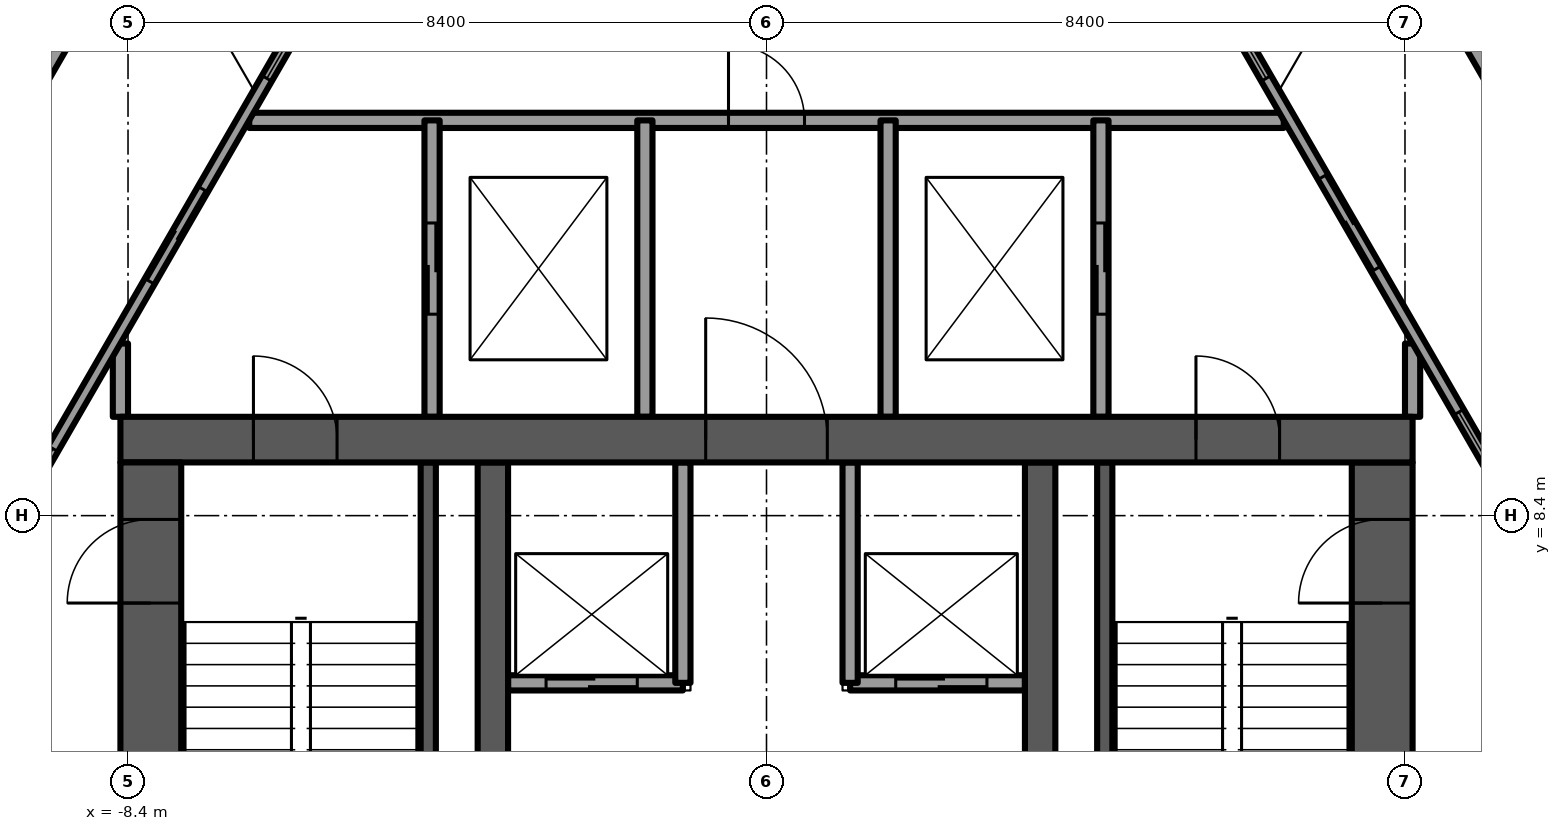
"""IFC4 building model, lengths in metres.
Left out: names, types, materials, properties, quantities, classifications, styles, units other than length and angle.
Written with IfcOpenShell. Run it as: python <this file> out.ifc"""

import sys

from ifc_helpers import new_model, si_unit, direction, frame, frame_2d, origin, place, context, subcontext, project, spatial, rectangle, extrude, element, fill, save


model = new_model("IFC4")
c1 = context("Model", 3, precision=1e-05, world=origin(), true_north=direction((0.0, 1.0)))
c2 = subcontext(c1, "Body", "Model", "MODEL_VIEW")
j1 = project(units=[si_unit("LENGTHUNIT", "METRE"), si_unit("PLANEANGLEUNIT", "RADIAN")], contexts=[c1])
p1 = place(None, origin())
s1 = spatial("IfcSite", under=j1, at=p1, CompositionType="ELEMENT")
p2 = place(p1, origin())
s2 = spatial("IfcBuilding", under=s1, at=p2, CompositionType="ELEMENT")
p3 = place(p2, frame((0.0, 0.0, 267.5)))
s3 = spatial("IfcBuildingStorey", under=s2, at=p3, CompositionType="ELEMENT", Elevation=267.5)
p4 = place(p3, frame((-8.5, 9.4, -0.3), z_axis=(0.0, 0.0, 1.0), x_axis=(1.0, 0.0, 0.0)))
e1 = element("IfcWall", 1, at=p4, inside=s3, PredefinedType="SHEAR", context=c2, shape_type="SweptSolid", body=[
    extrude(rectangle(XDim=17.0, YDim=0.6, at=frame_2d((8.5, 0.0))), origin(), (0.0, 0.0, 1.0), 3.75),
])
p5 = place(p4, frame((7.7, 0.0, 0.0)))
e2 = element("IfcOpeningElement", 2, at=p5, cuts=e1, PredefinedType="OPENING", context=c2, shape_type="SweptSolid", body=[
    extrude(rectangle(XDim=1.6, YDim=2.1, at=frame_2d((0.8, 1.05))), frame((0.0, 0.3, 0.0), z_axis=(0.0, -1.0, 0.0), x_axis=(1.0, 0.0, 0.0)), (0.0, 0.0, 1.0), 0.6),
])
p6 = place(p4, frame((1.75, 0.0, 0.0)))
e3 = element("IfcOpeningElement", 3, at=p6, cuts=e1, PredefinedType="OPENING", context=c2, shape_type="SweptSolid", body=[
    extrude(rectangle(XDim=1.1, YDim=2.1, at=frame_2d((0.55, 1.05))), frame((0.0, 0.3, 0.0), z_axis=(0.0, -1.0, 0.0), x_axis=(1.0, 0.0, 0.0)), (0.0, 0.0, 1.0), 0.6),
])
p7 = place(p4, frame((14.15, 0.0, 0.0)))
e4 = element("IfcOpeningElement", 4, at=p7, cuts=e1, PredefinedType="OPENING", context=c2, shape_type="SweptSolid", body=[
    extrude(rectangle(XDim=1.1, YDim=2.1, at=frame_2d((0.55, 1.05))), frame((0.0, 0.3, 0.0), z_axis=(0.0, -1.0, 0.0), x_axis=(1.0, 0.0, 0.0)), (0.0, 0.0, 1.0), 0.6),
])
p8 = place(p3, frame((-8.1, -1.1, -0.3), z_axis=(0.0, 0.0, 1.0), x_axis=(0.0, 1.0, 0.0)))
e5 = element("IfcWall", 5, at=p8, inside=s3, PredefinedType="SHEAR", context=c2, shape_type="SweptSolid", body=[
    extrude(rectangle(XDim=10.2, YDim=0.8, at=frame_2d((5.1, 0.0))), origin(), (0.0, 0.0, 1.0), 3.75),
])
p9 = place(p8, frame((8.35, 0.0, 0.0)))
e6 = element("IfcOpeningElement", 6, at=p9, cuts=e5, PredefinedType="OPENING", context=c2, shape_type="SweptSolid", body=[
    extrude(rectangle(XDim=1.1, YDim=2.1, at=frame_2d((0.55, 1.05))), frame((0.0, 0.4, 0.0), z_axis=(0.0, -1.0, 0.0), x_axis=(1.0, 0.0, 0.0)), (0.0, 0.0, 1.0), 0.8),
])
p10 = place(p3, frame((8.1, -1.1, -0.3), z_axis=(0.0, 0.0, 1.0), x_axis=(0.0, 1.0, 0.0)))
e7 = element("IfcWall", 7, at=p10, inside=s3, PredefinedType="SHEAR", context=c2, shape_type="SweptSolid", body=[
    extrude(rectangle(XDim=10.2, YDim=0.8, at=frame_2d((5.1, 0.0))), origin(), (0.0, 0.0, 1.0), 3.75),
])
p11 = place(p10, frame((8.35, 0.0, 0.0)))
e8 = element("IfcOpeningElement", 8, at=p11, cuts=e7, PredefinedType="OPENING", context=c2, shape_type="SweptSolid", body=[
    extrude(rectangle(XDim=1.1, YDim=2.1, at=frame_2d((0.55, 1.05))), frame((0.0, 0.4, 0.0), z_axis=(0.0, -1.0, 0.0), x_axis=(1.0, 0.0, 0.0)), (0.0, 0.0, 1.0), 0.8),
])
for number, where, z_axis, x_axis in (
    (9, (-3.6, -1.1, -0.3), (0.0, 0.0, 1.0), (0.0, 1.0, 0.0)),
    (10, (3.6, -1.1, -0.3), (0.0, 0.0, 1.0), (0.0, 1.0, 0.0)),
):
    element("IfcWall", number, at=place(p3, frame(where, z_axis=z_axis, x_axis=x_axis)), inside=s3, PredefinedType="SHEAR", context=c2, shape_type="SweptSolid", body=[
        extrude(rectangle(XDim=10.2, YDim=0.4, at=frame_2d((5.1, 0.0))), origin(), (0.0, 0.0, 1.0), 3.75),
    ])
for number, where, z_axis, x_axis in (
    (11, (-8.637, 16.428, 0.0), (0.0, 0.0, 1.0), (-0.5, -0.866, 0.0)),
    (12, (11.716, 11.094, 0.0), (0.0, 0.0, 1.0), (-0.5, 0.866, 0.0)),
):
    element("IfcWall", number, at=place(p3, frame(where, z_axis=z_axis, x_axis=x_axis)), inside=s3, PredefinedType="PARAPET", context=c2, shape_type="SweptSolid", body=[
        extrude(rectangle(XDim=6.159, YDim=0.9, at=frame_2d((3.08, 0.0))), origin(), (0.0, 0.0, 1.0), 1.1),
    ])
p12 = place(p3, frame((-5.626, 15.792, 0.0), z_axis=(0.0, 0.0, 1.0), x_axis=(-0.499998195608, -0.866026445548, 0.0)))
e13 = element("IfcWall", 13, at=p12, inside=s3, PredefinedType="SOLIDWALL", context=c2, shape_type="SweptSolid", body=[
    extrude(rectangle(XDim=18.956, YDim=0.15, at=frame_2d((9.478, 0.0))), origin(), (0.0, 0.0, 1.0), 3.45),
])
p13 = place(p12, frame((3.577, 0.0, 0.0)))
e14 = element("IfcOpeningElement", 14, at=p13, cuts=e13, PredefinedType="OPENING", context=c2, shape_type="SweptSolid", body=[
    extrude(rectangle(XDim=1.4, YDim=2.4, at=frame_2d((0.7, 1.2))), frame((0.0, 0.075, 0.0), z_axis=(0.0, -1.0, 0.0), x_axis=(1.0, 0.0, 0.0)), (0.0, 0.0, 1.0), 0.15),
])
p14 = place(p12, frame((9.62, 0.0, 0.15)))
e15 = element("IfcOpeningElement", 15, at=p14, cuts=e13, PredefinedType="OPENING", context=c2, shape_type="SweptSolid", body=[
    extrude(rectangle(XDim=0.9, YDim=2.85, at=frame_2d((0.45, 1.425))), frame((0.0, 0.075, 0.0), z_axis=(0.0, -1.0, 0.0), x_axis=(1.0, 0.0, 0.0)), (0.0, 0.0, 1.0), 0.15),
])
p15 = place(p12, frame((7.52, 0.0, 0.15)))
e16 = element("IfcOpeningElement", 16, at=p15, cuts=e13, PredefinedType="OPENING", context=c2, shape_type="SweptSolid", body=[
    extrude(rectangle(XDim=1.4, YDim=2.85, at=frame_2d((0.7, 1.425))), frame((0.0, 0.075, 0.0), z_axis=(0.0, -1.0, 0.0), x_axis=(1.0, 0.0, 0.0)), (0.0, 0.0, 1.0), 0.15),
])
p16 = place(p12, frame((11.164, 0.0, 0.15)))
e17 = element("IfcOpeningElement", 17, at=p16, cuts=e13, PredefinedType="OPENING", context=c2, shape_type="SweptSolid", body=[
    extrude(rectangle(XDim=1.5, YDim=2.85, at=frame_2d((0.75, 1.425))), frame((0.0, 0.075, 0.0), z_axis=(0.0, -1.0, 0.0), x_axis=(1.0, 0.0, 0.0)), (0.0, 0.0, 1.0), 0.15),
])
p17 = place(p12, frame((13.364, 0.0, 0.15)))
e18 = element("IfcOpeningElement", 18, at=p17, cuts=e13, PredefinedType="OPENING", context=c2, shape_type="SweptSolid", body=[
    extrude(rectangle(XDim=1.4, YDim=2.85, at=frame_2d((0.7, 1.425))), frame((0.0, 0.075, 0.0), z_axis=(0.0, -1.0, 0.0), x_axis=(1.0, 0.0, 0.0)), (0.0, 0.0, 1.0), 0.15),
])
p18 = place(p12, frame((0.394, 0.0, 0.15)))
e19 = element("IfcOpeningElement", 19, at=p18, cuts=e13, PredefinedType="OPENING", context=c2, shape_type="SweptSolid", body=[
    extrude(rectangle(XDim=1.5, YDim=2.73, at=frame_2d((0.75, 1.365))), frame((0.0, 0.075, 0.0), z_axis=(0.0, -1.0, 0.0), x_axis=(1.0, 0.0, 0.0)), (0.0, 0.0, 1.0), 0.15),
])
p19 = place(p12, frame((15.574, 0.0, 0.15)))
e20 = element("IfcOpeningElement", 20, at=p19, cuts=e13, PredefinedType="OPENING", context=c2, shape_type="SweptSolid", body=[
    extrude(rectangle(XDim=1.5, YDim=2.73, at=frame_2d((0.75, 1.365))), frame((0.0, 0.075, 0.0), z_axis=(0.0, -1.0, 0.0), x_axis=(1.0, 0.0, 0.0)), (0.0, 0.0, 1.0), 0.15),
])
p20 = place(p3, frame((15.104, -0.624, 0.0), z_axis=(0.0, 0.0, 1.0), x_axis=(-0.499998195608, 0.866026445548, 0.0)))
e21 = element("IfcWall", 21, at=p20, inside=s3, PredefinedType="SOLIDWALL", context=c2, shape_type="SweptSolid", body=[
    extrude(rectangle(XDim=18.956, YDim=0.15, at=frame_2d((9.478, 0.0))), origin(), (0.0, 0.0, 1.0), 3.45),
])
p21 = place(p20, frame((4.192, 0.0, 0.15)))
e22 = element("IfcOpeningElement", 22, at=p21, cuts=e21, PredefinedType="OPENING", context=c2, shape_type="SweptSolid", body=[
    extrude(rectangle(XDim=1.5, YDim=2.85, at=frame_2d((0.75, 1.425))), frame((0.0, 0.075, 0.0), z_axis=(0.0, -1.0, 0.0), x_axis=(1.0, 0.0, 0.0)), (0.0, 0.0, 1.0), 0.15),
])
p22 = place(p20, frame((6.392, 0.0, 0.15)))
e23 = element("IfcOpeningElement", 23, at=p22, cuts=e21, PredefinedType="OPENING", context=c2, shape_type="SweptSolid", body=[
    extrude(rectangle(XDim=1.4, YDim=2.85, at=frame_2d((0.7, 1.425))), frame((0.0, 0.075, 0.0), z_axis=(0.0, -1.0, 0.0), x_axis=(1.0, 0.0, 0.0)), (0.0, 0.0, 1.0), 0.15),
])
p23 = place(p20, frame((8.392, 0.0, 0.15)))
e24 = element("IfcOpeningElement", 24, at=p23, cuts=e21, PredefinedType="OPENING", context=c2, shape_type="SweptSolid", body=[
    extrude(rectangle(XDim=0.9, YDim=2.85, at=frame_2d((0.45, 1.425))), frame((0.0, 0.075, 0.0), z_axis=(0.0, -1.0, 0.0), x_axis=(1.0, 0.0, 0.0)), (0.0, 0.0, 1.0), 0.15),
])
p24 = place(p20, frame((10.592, 0.0, 0.15)))
e25 = element("IfcOpeningElement", 25, at=p24, cuts=e21, PredefinedType="OPENING", context=c2, shape_type="SweptSolid", body=[
    extrude(rectangle(XDim=1.4, YDim=2.85, at=frame_2d((0.7, 1.425))), frame((0.0, 0.075, 0.0), z_axis=(0.0, -1.0, 0.0), x_axis=(1.0, 0.0, 0.0)), (0.0, 0.0, 1.0), 0.15),
])
p25 = place(p20, frame((14.168, 0.0, 0.0)))
e26 = element("IfcOpeningElement", 26, at=p25, cuts=e21, PredefinedType="OPENING", context=c2, shape_type="SweptSolid", body=[
    extrude(rectangle(XDim=1.4, YDim=2.4, at=frame_2d((0.7, 1.2))), frame((0.0, 0.075, 0.0), z_axis=(0.0, -1.0, 0.0), x_axis=(1.0, 0.0, 0.0)), (0.0, 0.0, 1.0), 0.15),
])
p26 = place(p20, frame((0.998, 0.0, 0.15)))
e27 = element("IfcOpeningElement", 27, at=p26, cuts=e21, PredefinedType="OPENING", context=c2, shape_type="SweptSolid", body=[
    extrude(rectangle(XDim=1.5, YDim=2.73, at=frame_2d((0.75, 1.365))), frame((0.0, 0.075, 0.0), z_axis=(0.0, -1.0, 0.0), x_axis=(1.0, 0.0, 0.0)), (0.0, 0.0, 1.0), 0.15),
])
p27 = place(p20, frame((17.062, 0.0, 0.15)))
e28 = element("IfcOpeningElement", 28, at=p27, cuts=e21, PredefinedType="OPENING", context=c2, shape_type="SweptSolid", body=[
    extrude(rectangle(XDim=1.5, YDim=2.73, at=frame_2d((0.75, 1.365))), frame((0.0, 0.075, 0.0), z_axis=(0.0, -1.0, 0.0), x_axis=(1.0, 0.0, 0.0)), (0.0, 0.0, 1.0), 0.15),
])
p28 = place(p3, frame((-3.4, 6.2, 0.0), z_axis=(0.0, 0.0, 1.0), x_axis=(1.0, 0.0, 0.0)))
e29 = element("IfcWall", 29, at=p28, inside=s3, PredefinedType="PARTITIONING", context=c2, shape_type="SweptSolid", body=[
    extrude(rectangle(XDim=2.3, YDim=0.2, at=frame_2d((1.15, 0.0))), origin(), (0.0, 0.0, 1.0), 3.45),
])
p29 = place(p28, frame((0.5, 0.0, 0.0)))
e30 = element("IfcOpeningElement", 30, at=p29, cuts=e29, PredefinedType="OPENING", context=c2, shape_type="SweptSolid", body=[
    extrude(rectangle(XDim=1.2, YDim=2.1, at=frame_2d((0.6, 1.05))), frame((0.0, 0.1, 0.0), z_axis=(0.0, -1.0, 0.0), x_axis=(1.0, 0.0, 0.0)), (0.0, 0.0, 1.0), 0.2),
])
p30 = place(p3, frame((1.1, 6.2, 0.0), z_axis=(0.0, 0.0, 1.0), x_axis=(1.0, 0.0, 0.0)))
e31 = element("IfcWall", 31, at=p30, inside=s3, PredefinedType="PARTITIONING", context=c2, shape_type="SweptSolid", body=[
    extrude(rectangle(XDim=2.3, YDim=0.2, at=frame_2d((1.15, 0.0))), origin(), (0.0, 0.0, 1.0), 3.45),
])
p31 = place(p30, frame((0.6, 0.0, 0.0)))
e32 = element("IfcOpeningElement", 32, at=p31, cuts=e31, PredefinedType="OPENING", context=c2, shape_type="SweptSolid", body=[
    extrude(rectangle(XDim=1.2, YDim=2.1, at=frame_2d((0.6, 1.05))), frame((0.0, 0.1, 0.0), z_axis=(0.0, -1.0, 0.0), x_axis=(1.0, 0.0, 0.0)), (0.0, 0.0, 1.0), 0.2),
])
for number, where, z_axis, x_axis in (
    (33, (-1.1, 6.2, 0.0), (0.0, 0.0, 1.0), (0.0, 1.0, 0.0)),
    (34, (1.1, 6.2, 0.0), (0.0, 0.0, 1.0), (0.0, 1.0, 0.0)),
):
    element("IfcWall", number, at=place(p3, frame(where, z_axis=z_axis, x_axis=x_axis)), inside=s3, PredefinedType="PARTITIONING", context=c2, shape_type="SweptSolid", body=[
        extrude(rectangle(XDim=2.9, YDim=0.2, at=frame_2d((1.45, 0.0))), origin(), (0.0, 0.0, 1.0), 3.45),
    ])
for number, where, z_axis, x_axis in (
    (35, (-4.45, 0.9, -0.3), (0.0, 0.0, 1.0), (0.0, 1.0, 0.0)),
    (36, (4.45, 0.9, -0.3), (0.0, 0.0, 1.0), (0.0, 1.0, 0.0)),
):
    element("IfcWall", number, at=place(p3, frame(where, z_axis=z_axis, x_axis=x_axis)), inside=s3, PredefinedType="SOLIDWALL", context=c2, shape_type="SweptSolid", body=[
        extrude(rectangle(XDim=8.2, YDim=0.2, at=frame_2d((4.1, 0.0))), origin(), (0.0, 0.0, 1.0), 3.75),
    ])
p32 = place(p3, frame((-6.805, 13.6, 0.0), z_axis=(0.0, 0.0, 1.0), x_axis=(1.0, 0.0, 0.0)))
e37 = element("IfcWall", 37, at=p32, inside=s3, PredefinedType="PARTITIONING", context=c2, shape_type="SweptSolid", body=[
    extrude(rectangle(XDim=13.611, YDim=0.2, at=frame_2d((6.805, 0.0))), origin(), (0.0, 0.0, 1.0), 3.45),
])
p33 = place(p32, frame((6.305, 0.0, 0.0)))
e38 = element("IfcOpeningElement", 38, at=p33, cuts=e37, PredefinedType="OPENING", context=c2, shape_type="SweptSolid", body=[
    extrude(rectangle(XDim=1.0, YDim=2.1, at=frame_2d((0.5, 1.05))), frame((0.0, 0.1, 0.0), z_axis=(0.0, -1.0, 0.0), x_axis=(1.0, 0.0, 0.0)), (0.0, 0.0, 1.0), 0.2),
])
for number, where, z_axis, x_axis in (
    (39, (-8.5, 9.7, 0.0), (0.0, 0.0, 1.0), (0.0, 1.0, 0.0)),
    (40, (8.5, 9.7, 0.0), (0.0, 0.0, 1.0), (0.0, 1.0, 0.0)),
):
    element("IfcWall", number, at=place(p3, frame(where, z_axis=z_axis, x_axis=x_axis)), inside=s3, PredefinedType="PARTITIONING", context=c2, shape_type="SweptSolid", body=[
        extrude(rectangle(XDim=0.965, YDim=0.2, at=frame_2d((0.482, 0.0))), origin(), (0.0, 0.0, 1.0), 3.45),
    ])
p34 = place(p3, frame((-4.4, 9.7, 0.0), z_axis=(0.0, 0.0, 1.0), x_axis=(0.0, 1.0, 0.0)))
e41 = element("IfcWall", 41, at=p34, inside=s3, PredefinedType="PARTITIONING", context=c2, shape_type="SweptSolid", body=[
    extrude(rectangle(XDim=3.9, YDim=0.2, at=frame_2d((1.95, 0.0))), origin(), (0.0, 0.0, 1.0), 3.45),
])
p35 = place(p34, frame((1.35, 0.0, 0.0)))
e42 = element("IfcOpeningElement", 42, at=p35, cuts=e41, PredefinedType="OPENING", context=c2, shape_type="SweptSolid", body=[
    extrude(rectangle(XDim=1.2, YDim=2.1, at=frame_2d((0.6, 1.05))), frame((0.0, 0.1, 0.0), z_axis=(0.0, -1.0, 0.0), x_axis=(1.0, 0.0, 0.0)), (0.0, 0.0, 1.0), 0.2),
])
p36 = place(p3, frame((4.4, 9.7, 0.0), z_axis=(0.0, 0.0, 1.0), x_axis=(0.0, 1.0, 0.0)))
e43 = element("IfcWall", 43, at=p36, inside=s3, PredefinedType="PARTITIONING", context=c2, shape_type="SweptSolid", body=[
    extrude(rectangle(XDim=3.9, YDim=0.2, at=frame_2d((1.95, 0.0))), origin(), (0.0, 0.0, 1.0), 3.45),
])
p37 = place(p36, frame((1.35, 0.0, 0.0)))
e44 = element("IfcOpeningElement", 44, at=p37, cuts=e43, PredefinedType="OPENING", context=c2, shape_type="SweptSolid", body=[
    extrude(rectangle(XDim=1.2, YDim=2.1, at=frame_2d((0.6, 1.05))), frame((0.0, 0.1, 0.0), z_axis=(0.0, -1.0, 0.0), x_axis=(1.0, 0.0, 0.0)), (0.0, 0.0, 1.0), 0.2),
])
for number, where, z_axis, x_axis in (
    (45, (-1.6, 9.7, 0.0), (0.0, 0.0, 1.0), (0.0, 1.0, 0.0)),
    (46, (1.6, 9.7, 0.0), (0.0, 0.0, 1.0), (0.0, 1.0, 0.0)),
):
    element("IfcWall", number, at=place(p3, frame(where, z_axis=z_axis, x_axis=x_axis)), inside=s3, PredefinedType="PARTITIONING", context=c2, shape_type="SweptSolid", body=[
        extrude(rectangle(XDim=3.9, YDim=0.2, at=frame_2d((1.95, 0.0))), origin(), (0.0, 0.0, 1.0), 3.45),
    ])
p38 = place(p13, origin())
e47 = element("IfcDoor", 47, at=p38, inside=s3, OperationType="SLIDING_TO_LEFT", PredefinedType="DOOR", context=c2, shape_type="SweptSolid", body=[
    extrude(rectangle(XDim=1.4, YDim=2.4, at=frame_2d((0.7, 1.2))), frame((0.0, 0.025, 0.0), z_axis=(0.0, -1.0, 0.0), x_axis=(1.0, 0.0, 0.0)), (0.0, 0.0, 1.0), 0.05),
])
fill(e14, e47)
p39 = place(p15, origin())
e48 = element("IfcWindow", 48, at=p39, inside=s3, PartitioningType="SINGLE_PANEL", PredefinedType="WINDOW", context=c2, shape_type="SweptSolid", body=[
    extrude(rectangle(XDim=1.4, YDim=2.85, at=frame_2d((0.7, 1.425))), frame((0.0, 0.03, 0.0), z_axis=(0.0, -1.0, 0.0), x_axis=(1.0, 0.0, 0.0)), (0.0, 0.0, 1.0), 0.06),
])
fill(e16, e48)
p40 = place(p18, origin())
e49 = element("IfcWindow", 49, at=p40, inside=s3, PartitioningType="SINGLE_PANEL", PredefinedType="WINDOW", context=c2, shape_type="SweptSolid", body=[
    extrude(rectangle(XDim=1.5, YDim=2.73, at=frame_2d((0.75, 1.365))), frame((0.0, 0.03, 0.0), z_axis=(0.0, -1.0, 0.0), x_axis=(1.0, 0.0, 0.0)), (0.0, 0.0, 1.0), 0.06),
])
fill(e19, e49)
p41 = place(p24, origin())
e50 = element("IfcWindow", 50, at=p41, inside=s3, PartitioningType="SINGLE_PANEL", PredefinedType="WINDOW", context=c2, shape_type="SweptSolid", body=[
    extrude(rectangle(XDim=1.4, YDim=2.85, at=frame_2d((0.7, 1.425))), frame((0.0, 0.03, 0.0), z_axis=(0.0, -1.0, 0.0), x_axis=(1.0, 0.0, 0.0)), (0.0, 0.0, 1.0), 0.06),
])
fill(e25, e50)
p42 = place(p25, origin())
e51 = element("IfcDoor", 51, at=p42, inside=s3, OperationType="SLIDING_TO_RIGHT", PredefinedType="DOOR", context=c2, shape_type="SweptSolid", body=[
    extrude(rectangle(XDim=1.4, YDim=2.4, at=frame_2d((0.7, 1.2))), frame((0.0, 0.025, 0.0), z_axis=(0.0, -1.0, 0.0), x_axis=(1.0, 0.0, 0.0)), (0.0, 0.0, 1.0), 0.05),
])
fill(e26, e51)
p43 = place(p27, origin())
e52 = element("IfcWindow", 52, at=p43, inside=s3, PartitioningType="SINGLE_PANEL", PredefinedType="WINDOW", context=c2, shape_type="SweptSolid", body=[
    extrude(rectangle(XDim=1.5, YDim=2.73, at=frame_2d((0.75, 1.365))), frame((0.0, 0.03, 0.0), z_axis=(0.0, -1.0, 0.0), x_axis=(1.0, 0.0, 0.0)), (0.0, 0.0, 1.0), 0.06),
])
fill(e28, e52)
p44 = place(p29, origin())
e53 = element("IfcDoor", 53, at=p44, inside=s3, OperationType="SLIDING_TO_LEFT", PredefinedType="DOOR", context=c2, shape_type="SweptSolid", body=[
    extrude(rectangle(XDim=1.2, YDim=2.1, at=frame_2d((0.6, 1.05))), frame((0.0, 0.025, 0.0), z_axis=(0.0, -1.0, 0.0), x_axis=(1.0, 0.0, 0.0)), (0.0, 0.0, 1.0), 0.05),
])
fill(e30, e53)
p45 = place(p31, origin())
e54 = element("IfcDoor", 54, at=p45, inside=s3, OperationType="SLIDING_TO_LEFT", PredefinedType="DOOR", context=c2, shape_type="SweptSolid", body=[
    extrude(rectangle(XDim=1.2, YDim=2.1, at=frame_2d((0.6, 1.05))), frame((0.0, 0.025, 0.0), z_axis=(0.0, -1.0, 0.0), x_axis=(1.0, 0.0, 0.0)), (0.0, 0.0, 1.0), 0.05),
])
fill(e32, e54)
p46 = place(p5, origin())
e55 = element("IfcDoor", 55, at=p46, inside=s3, OperationType="DOUBLE_DOOR_SINGLE_SWING", PredefinedType="DOOR", context=c2, shape_type="SweptSolid", body=[
    extrude(rectangle(XDim=1.6, YDim=2.1, at=frame_2d((0.8, 1.05))), frame((0.0, 0.025, 0.0), z_axis=(0.0, -1.0, 0.0), x_axis=(1.0, 0.0, 0.0)), (0.0, 0.0, 1.0), 0.05),
])
fill(e2, e55)
p47 = place(p6, origin())
e56 = element("IfcDoor", 56, at=p47, inside=s3, OperationType="SINGLE_SWING_LEFT", PredefinedType="DOOR", context=c2, shape_type="SweptSolid", body=[
    extrude(rectangle(XDim=1.1, YDim=2.1, at=frame_2d((0.55, 1.05))), frame((0.0, 0.025, 0.0), z_axis=(0.0, -1.0, 0.0), x_axis=(1.0, 0.0, 0.0)), (0.0, 0.0, 1.0), 0.05),
])
fill(e3, e56)
p48 = place(p9, origin())
e57 = element("IfcDoor", 57, at=p48, inside=s3, OperationType="SINGLE_SWING_RIGHT", PredefinedType="DOOR", context=c2, shape_type="SweptSolid", body=[
    extrude(rectangle(XDim=1.1, YDim=2.1, at=frame_2d((0.55, 1.05))), frame((0.0, 0.025, 0.0), z_axis=(0.0, -1.0, 0.0), x_axis=(1.0, 0.0, 0.0)), (0.0, 0.0, 1.0), 0.05),
])
fill(e6, e57)
p49 = place(p7, origin())
e58 = element("IfcDoor", 58, at=p49, inside=s3, OperationType="SINGLE_SWING_RIGHT", PredefinedType="DOOR", context=c2, shape_type="SweptSolid", body=[
    extrude(rectangle(XDim=1.1, YDim=2.1, at=frame_2d((0.55, 1.05))), frame((0.0, 0.025, 0.0), z_axis=(0.0, -1.0, 0.0), x_axis=(1.0, 0.0, 0.0)), (0.0, 0.0, 1.0), 0.05),
])
fill(e4, e58)
p50 = place(p11, origin())
e59 = element("IfcDoor", 59, at=p50, inside=s3, OperationType="SINGLE_SWING_LEFT", PredefinedType="DOOR", context=c2, shape_type="SweptSolid", body=[
    extrude(rectangle(XDim=1.1, YDim=2.1, at=frame_2d((0.55, 1.05))), frame((0.0, 0.025, 0.0), z_axis=(0.0, -1.0, 0.0), x_axis=(1.0, 0.0, 0.0)), (0.0, 0.0, 1.0), 0.05),
])
fill(e8, e59)
p51 = place(p35, origin())
e60 = element("IfcDoor", 60, at=p51, inside=s3, OperationType="SLIDING_TO_LEFT", PredefinedType="DOOR", context=c2, shape_type="SweptSolid", body=[
    extrude(rectangle(XDim=1.2, YDim=2.1, at=frame_2d((0.6, 1.05))), frame((0.0, 0.025, 0.0), z_axis=(0.0, -1.0, 0.0), x_axis=(1.0, 0.0, 0.0)), (0.0, 0.0, 1.0), 0.05),
])
fill(e42, e60)
p52 = place(p37, origin())
e61 = element("IfcDoor", 61, at=p52, inside=s3, OperationType="SLIDING_TO_LEFT", PredefinedType="DOOR", context=c2, shape_type="SweptSolid", body=[
    extrude(rectangle(XDim=1.2, YDim=2.1, at=frame_2d((0.6, 1.05))), frame((0.0, 0.025, 0.0), z_axis=(0.0, -1.0, 0.0), x_axis=(1.0, 0.0, 0.0)), (0.0, 0.0, 1.0), 0.05),
])
fill(e44, e61)
p53 = place(p33, origin())
e62 = element("IfcDoor", 62, at=p53, inside=s3, OperationType="SINGLE_SWING_LEFT", PredefinedType="DOOR", context=c2, shape_type="SweptSolid", body=[
    extrude(rectangle(XDim=1.0, YDim=2.1, at=frame_2d((0.5, 1.05))), frame((0.0, 0.025, 0.0), z_axis=(0.0, -1.0, 0.0), x_axis=(1.0, 0.0, 0.0)), (0.0, 0.0, 1.0), 0.05),
])
fill(e38, e62)
save(model, sys.argv[1])
